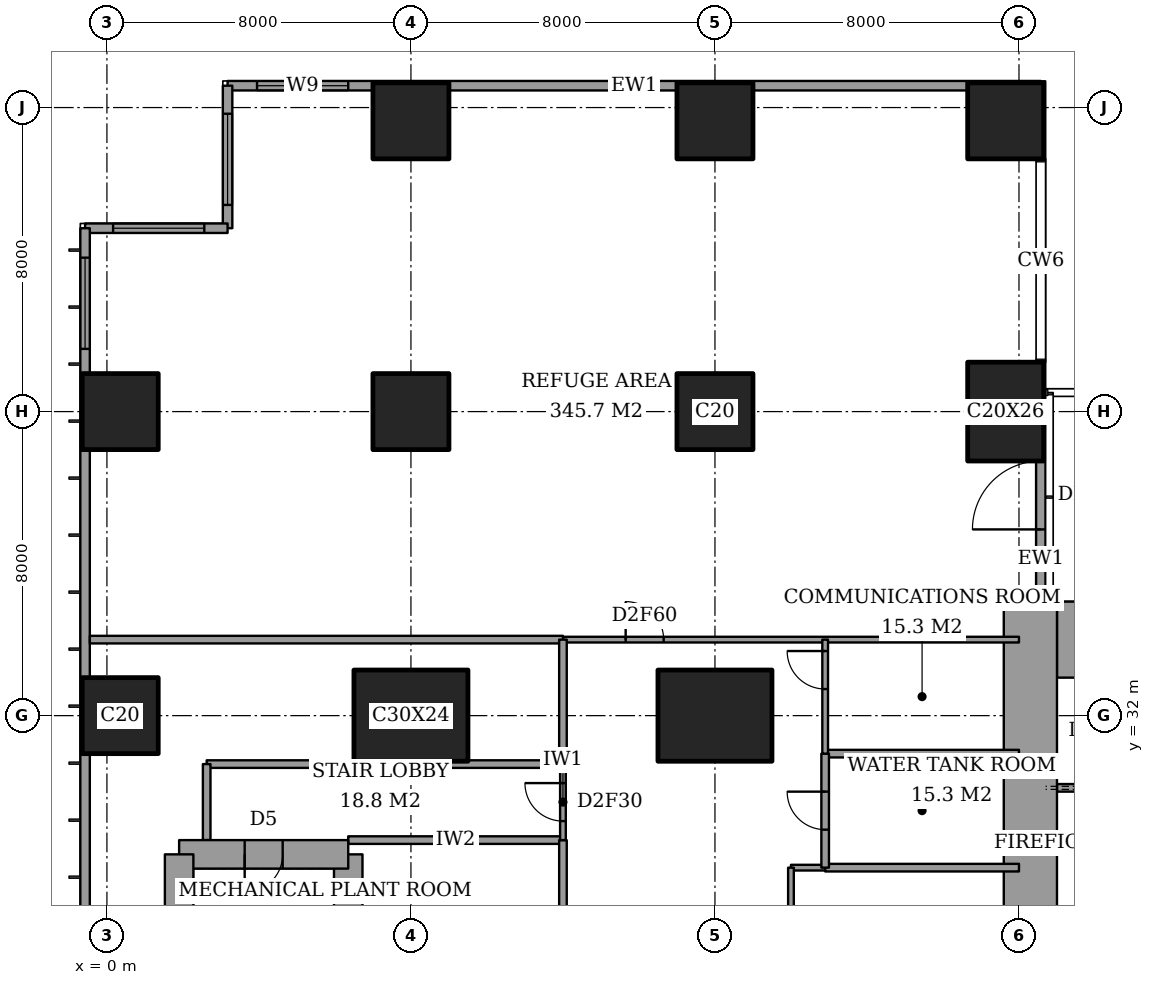
"""IFC4 building model, lengths in metres.
Left out: names, types, materials, properties, quantities, classifications, styles, units other than length and angle.
Written with IfcOpenShell. Run it as: python <this file> out.ifc"""

import sys

from ifc_helpers import new_model, si_unit, direction, frame, frame_2d, origin, origin_2d, place, context, subcontext, project, spatial, rectangle, extrude, element, fill, save


model = new_model("IFC4")
c1 = context("Model", 3, precision=1e-05, world=origin(), true_north=direction((0.0, 1.0)))
c2 = subcontext(c1, "Body", "Model", "MODEL_VIEW")
j1 = project(units=[si_unit("LENGTHUNIT", "METRE"), si_unit("PLANEANGLEUNIT", "RADIAN")], contexts=[c1])
p1 = place(None, origin())
s1 = spatial("IfcSite", under=j1, at=p1, CompositionType="ELEMENT")
p2 = place(p1, origin())
s2 = spatial("IfcBuilding", under=s1, at=p2, CompositionType="ELEMENT")
p3 = place(p2, frame((0.0, 0.0, 90.8)))
s3 = spatial("IfcBuildingStorey", under=s2, at=p3, CompositionType="ELEMENT", Elevation=90.8)
for number, where, z_axis, x_axis in (
    (1, (0.35, 32.0, 0.0), (0.0, 0.0, 1.0), (1.0, 0.0, 0.0)),
    (2, (0.35, 40.0, 0.0), (0.0, 0.0, 1.0), (1.0, 0.0, 0.0)),
):
    element("IfcColumn", number, at=place(p3, frame(where, z_axis=z_axis, x_axis=x_axis)), inside=s3, PredefinedType="COLUMN", context=c2, shape_type="SweptSolid", body=[
        extrude(rectangle(XDim=2.0, YDim=2.0, at=origin_2d()), origin(), (0.0, 0.0, 1.0), 5.4),
    ])
p4 = place(p3, frame((8.0, 32.0, 0.0), z_axis=(0.0, 0.0, 1.0), x_axis=(1.0, 0.0, 0.0)))
e3 = element("IfcColumn", 3, at=p4, inside=s3, PredefinedType="COLUMN", context=c2, shape_type="SweptSolid", body=[
    extrude(rectangle(XDim=3.0, YDim=2.4, at=origin_2d()), origin(), (0.0, 0.0, 1.0), 5.4),
])
for number, where, z_axis, x_axis in (
    (4, (8.0, 40.0, 0.0), (0.0, 0.0, 1.0), (1.0, 0.0, 0.0)),
    (5, (8.0, 47.65, 0.0), (0.0, 0.0, 1.0), (1.0, 0.0, 0.0)),
):
    element("IfcColumn", number, at=place(p3, frame(where, z_axis=z_axis, x_axis=x_axis)), inside=s3, PredefinedType="COLUMN", context=c2, shape_type="SweptSolid", body=[
        extrude(rectangle(XDim=2.0, YDim=2.0, at=origin_2d()), origin(), (0.0, 0.0, 1.0), 5.4),
    ])
p5 = place(p3, frame((16.0, 32.0, 0.0), z_axis=(0.0, 0.0, 1.0), x_axis=(1.0, 0.0, 0.0)))
e6 = element("IfcColumn", 6, at=p5, inside=s3, PredefinedType="COLUMN", context=c2, shape_type="SweptSolid", body=[
    extrude(rectangle(XDim=3.0, YDim=2.4, at=origin_2d()), origin(), (0.0, 0.0, 1.0), 5.4),
])
for number, where, z_axis, x_axis in (
    (7, (16.0, 40.0, 0.0), (0.0, 0.0, 1.0), (1.0, 0.0, 0.0)),
    (8, (16.0, 47.65, 0.0), (0.0, 0.0, 1.0), (1.0, 0.0, 0.0)),
):
    element("IfcColumn", number, at=place(p3, frame(where, z_axis=z_axis, x_axis=x_axis)), inside=s3, PredefinedType="COLUMN", context=c2, shape_type="SweptSolid", body=[
        extrude(rectangle(XDim=2.0, YDim=2.0, at=origin_2d()), origin(), (0.0, 0.0, 1.0), 5.4),
    ])
p6 = place(p3, frame((23.65, 40.0, 0.0), z_axis=(0.0, 0.0, 1.0), x_axis=(1.0, 0.0, 0.0)))
e9 = element("IfcColumn", 9, at=p6, inside=s3, PredefinedType="COLUMN", context=c2, shape_type="SweptSolid", body=[
    extrude(rectangle(XDim=2.0, YDim=2.6, at=origin_2d()), origin(), (0.0, 0.0, 1.0), 5.4),
])
p7 = place(p3, frame((23.65, 47.65, 0.0), z_axis=(0.0, 0.0, 1.0), x_axis=(1.0, 0.0, 0.0)))
e10 = element("IfcColumn", 10, at=p7, inside=s3, PredefinedType="COLUMN", context=c2, shape_type="SweptSolid", body=[
    extrude(rectangle(XDim=2.0, YDim=2.0, at=origin_2d()), origin(), (0.0, 0.0, 1.0), 5.4),
])
p8 = place(p3, frame((25.0, 34.0, 0.0), z_axis=(0.0, 0.0, 1.0), x_axis=(1.0, 0.0, 0.0)))
e11 = element("IfcWall", 11, at=p8, inside=s3, PredefinedType="SHEAR", context=c2, shape_type="SweptSolid", body=[
    extrude(rectangle(XDim=3.15, YDim=2.0, at=frame_2d((1.575, 0.0))), origin(), (0.0, 0.0, 1.0), 5.4),
])
p9 = place(p3, frame((24.3, 23.15, 0.0), z_axis=(0.0, 0.0, 1.0), x_axis=(0.0, 1.0, 0.0)))
e12 = element("IfcWall", 12, at=p9, inside=s3, PredefinedType="SHEAR", context=c2, shape_type="SweptSolid", body=[
    extrude(rectangle(XDim=11.85, YDim=1.4, at=frame_2d((5.925, 0.0))), origin(), (0.0, 0.0, 1.0), 5.4),
])
p10 = place(p9, frame((0.75, 0.0, 0.0)))
e13 = element("IfcOpeningElement", 13, at=p10, cuts=e12, PredefinedType="OPENING", context=c2, shape_type="SweptSolid", body=[
    extrude(rectangle(XDim=1.8, YDim=2.4, at=frame_2d((0.9, 1.2))), frame((0.0, 0.71, 0.0), z_axis=(0.0, -1.0, 0.0), x_axis=(1.0, 0.0, 0.0)), (0.0, 0.0, 1.0), 1.42),
])
p11 = place(p3, frame((6.35, 19.65, 0.0), z_axis=(0.0, 0.0, 1.0), x_axis=(0.0, 1.0, 0.0)))
e14 = element("IfcWall", 14, at=p11, inside=s3, PredefinedType="SHEAR", context=c2, shape_type="SweptSolid", body=[
    extrude(rectangle(XDim=8.7, YDim=0.75, at=frame_2d((4.35, 0.0))), origin(), (0.0, 0.0, 1.0), 5.4),
])
p12 = place(p3, frame((6.35, 28.35, 0.0), z_axis=(0.0, 0.0, 1.0), x_axis=(-1.0, 0.0, 0.0)))
e15 = element("IfcWall", 15, at=p12, inside=s3, PredefinedType="SHEAR", context=c2, shape_type="SweptSolid", body=[
    extrude(rectangle(XDim=4.45, YDim=0.75, at=frame_2d((2.225, 0.0))), origin(), (0.0, 0.0, 1.0), 5.4),
])
p13 = place(p12, frame((1.725, 0.0, 0.0)))
e16 = element("IfcOpeningElement", 16, at=p13, cuts=e15, PredefinedType="OPENING", context=c2, shape_type="SweptSolid", body=[
    extrude(rectangle(XDim=1.0, YDim=2.1, at=frame_2d((0.5, 1.05))), frame((0.0, 0.385, 0.0), z_axis=(0.0, -1.0, 0.0), x_axis=(1.0, 0.0, 0.0)), (0.0, 0.0, 1.0), 0.77),
])
p14 = place(p3, frame((1.9, 28.35, 0.0), z_axis=(0.0, 0.0, 1.0), x_axis=(0.0, -1.0, 0.0)))
e17 = element("IfcWall", 17, at=p14, inside=s3, PredefinedType="SHEAR", context=c2, shape_type="SweptSolid", body=[
    extrude(rectangle(XDim=8.7, YDim=0.75, at=frame_2d((4.35, 0.0))), origin(), (0.0, 0.0, 1.0), 5.4),
])
p15 = place(p3, frame((24.575, 35.0, 0.0), z_axis=(0.0, 0.0, 1.0), x_axis=(0.0, 1.0, 0.0)))
e18 = element("IfcWall", 18, at=p15, inside=s3, PredefinedType="SOLIDWALL", context=c2, shape_type="SweptSolid", body=[
    extrude(rectangle(XDim=5.6, YDim=0.25, at=frame_2d((2.8, 0.0))), origin(), (0.0, 0.0, 1.0), 5.4),
])
p16 = place(p15, frame((1.9, 0.0, 0.0)))
e19 = element("IfcOpeningElement", 19, at=p16, cuts=e18, PredefinedType="OPENING", context=c2, shape_type="SweptSolid", body=[
    extrude(rectangle(XDim=1.8, YDim=2.4, at=frame_2d((0.9, 1.2))), frame((0.0, 0.135, 0.0), z_axis=(0.0, -1.0, 0.0), x_axis=(1.0, 0.0, 0.0)), (0.0, 0.0, 1.0), 0.27),
])
p17 = place(p3, frame((24.575, 48.575, 0.0), z_axis=(0.0, 0.0, 1.0), x_axis=(-1.0, 0.0, 0.0)))
e20 = element("IfcWall", 20, at=p17, inside=s3, PredefinedType="SOLIDWALL", context=c2, shape_type="SweptSolid", body=[
    extrude(rectangle(XDim=21.4, YDim=0.25, at=frame_2d((10.7, 0.0))), origin(), (0.0, 0.0, 1.0), 5.4),
])
p18 = place(p17, frame((18.225, 0.0, 0.9)))
e21 = element("IfcOpeningElement", 21, at=p18, cuts=e20, PredefinedType="OPENING", context=c2, shape_type="SweptSolid", body=[
    extrude(rectangle(XDim=2.4, YDim=2.4, at=frame_2d((1.2, 1.2))), frame((0.0, 0.135, 0.0), z_axis=(0.0, -1.0, 0.0), x_axis=(1.0, 0.0, 0.0)), (0.0, 0.0, 1.0), 0.27),
])
p19 = place(p3, frame((3.175, 48.575, 0.0), z_axis=(0.0, 0.0, 1.0), x_axis=(0.0, -1.0, 0.0)))
e22 = element("IfcWall", 22, at=p19, inside=s3, PredefinedType="SOLIDWALL", context=c2, shape_type="SweptSolid", body=[
    extrude(rectangle(XDim=3.75, YDim=0.25, at=frame_2d((1.875, 0.0))), origin(), (0.0, 0.0, 1.0), 5.4),
])
p20 = place(p19, frame((0.738, 0.0, 0.9)))
e23 = element("IfcOpeningElement", 23, at=p20, cuts=e22, PredefinedType="OPENING", context=c2, shape_type="SweptSolid", body=[
    extrude(rectangle(XDim=2.4, YDim=2.4, at=frame_2d((1.2, 1.2))), frame((0.0, 0.135, 0.0), z_axis=(0.0, -1.0, 0.0), x_axis=(1.0, 0.0, 0.0)), (0.0, 0.0, 1.0), 0.27),
])
p21 = place(p3, frame((3.175, 44.825, 0.0), z_axis=(0.0, 0.0, 1.0), x_axis=(-1.0, 0.0, 0.0)))
e24 = element("IfcWall", 24, at=p21, inside=s3, PredefinedType="SOLIDWALL", context=c2, shape_type="SweptSolid", body=[
    extrude(rectangle(XDim=3.75, YDim=0.25, at=frame_2d((1.875, 0.0))), origin(), (0.0, 0.0, 1.0), 5.4),
])
p22 = place(p21, frame((0.613, 0.0, 0.9)))
e25 = element("IfcOpeningElement", 25, at=p22, cuts=e24, PredefinedType="OPENING", context=c2, shape_type="SweptSolid", body=[
    extrude(rectangle(XDim=2.4, YDim=2.4, at=frame_2d((1.2, 1.2))), frame((0.0, 0.135, 0.0), z_axis=(0.0, -1.0, 0.0), x_axis=(1.0, 0.0, 0.0)), (0.0, 0.0, 1.0), 0.27),
])
p23 = place(p3, frame((-0.575, 44.825, 0.0), z_axis=(0.0, 0.0, 1.0), x_axis=(0.0, -1.0, 0.0)))
e26 = element("IfcWall", 26, at=p23, inside=s3, PredefinedType="SOLIDWALL", context=c2, shape_type="SweptSolid", body=[
    extrude(rectangle(XDim=41.65, YDim=0.25, at=frame_2d((20.825, 0.0))), origin(), (0.0, 0.0, 1.0), 5.4),
])
p24 = place(p23, frame((0.775, 0.0, 0.9)))
e27 = element("IfcOpeningElement", 27, at=p24, cuts=e26, PredefinedType="OPENING", context=c2, shape_type="SweptSolid", body=[
    extrude(rectangle(XDim=2.4, YDim=2.4, at=frame_2d((1.2, 1.2))), frame((0.0, 0.135, 0.0), z_axis=(0.0, -1.0, 0.0), x_axis=(1.0, 0.0, 0.0)), (0.0, 0.0, 1.0), 0.27),
])
p25 = place(p23, frame((38.475, 0.0, 0.9)))
e28 = element("IfcOpeningElement", 28, at=p25, cuts=e26, PredefinedType="OPENING", context=c2, shape_type="SweptSolid", body=[
    extrude(rectangle(XDim=2.4, YDim=2.4, at=frame_2d((1.2, 1.2))), frame((0.0, 0.135, 0.0), z_axis=(0.0, -1.0, 0.0), x_axis=(1.0, 0.0, 0.0)), (0.0, 0.0, 1.0), 0.27),
])
p26 = place(p3, frame((18.9, 28.0, 0.0), z_axis=(0.0, 0.0, 1.0), x_axis=(1.0, 0.0, 0.0)))
e29 = element("IfcWall", 29, at=p26, inside=s3, PredefinedType="PARTITIONING", context=c2, shape_type="SweptSolid", body=[
    extrude(rectangle(XDim=5.1, YDim=0.2, at=frame_2d((2.55, 0.0))), origin(), (0.0, 0.0, 1.0), 5.15),
])
p27 = place(p3, frame((18.0, 28.0, 0.0), z_axis=(0.0, 0.0, 1.0), x_axis=(1.0, 0.0, 0.0)))
e30 = element("IfcWall", 30, at=p27, inside=s3, PredefinedType="PARTITIONING", context=c2, shape_type="SweptSolid", body=[
    extrude(rectangle(XDim=0.9, YDim=0.15, at=frame_2d((0.45, 0.0))), origin(), (0.0, 0.0, 1.0), 5.15),
])
p28 = place(p3, frame((6.35, 28.725, 0.0), z_axis=(0.0, 0.0, 1.0), x_axis=(1.0, 0.0, 0.0)))
e31 = element("IfcWall", 31, at=p28, inside=s3, PredefinedType="PARTITIONING", context=c2, shape_type="SweptSolid", body=[
    extrude(rectangle(XDim=5.65, YDim=0.2, at=frame_2d((2.825, 0.0))), origin(), (0.0, 0.0, 1.0), 5.15),
])
p29 = place(p3, frame((2.625, 30.725, 0.0), z_axis=(0.0, 0.0, 1.0), x_axis=(1.0, 0.0, 0.0)))
e32 = element("IfcWall", 32, at=p29, inside=s3, PredefinedType="PARTITIONING", context=c2, shape_type="SweptSolid", body=[
    extrude(rectangle(XDim=9.375, YDim=0.2, at=frame_2d((4.688, 0.0))), origin(), (0.0, 0.0, 1.0), 5.15),
])
p30 = place(p3, frame((18.9, 31.0, 0.0), z_axis=(0.0, 0.0, 1.0), x_axis=(1.0, 0.0, 0.0)))
e33 = element("IfcWall", 33, at=p30, inside=s3, PredefinedType="PARTITIONING", context=c2, shape_type="SweptSolid", body=[
    extrude(rectangle(XDim=5.1, YDim=0.2, at=frame_2d((2.55, 0.0))), origin(), (0.0, 0.0, 1.0), 5.15),
])
p31 = place(p3, frame((-0.45, 34.0, 0.0), z_axis=(0.0, 0.0, 1.0), x_axis=(1.0, 0.0, 0.0)))
e34 = element("IfcWall", 34, at=p31, inside=s3, PredefinedType="PARTITIONING", context=c2, shape_type="SweptSolid", body=[
    extrude(rectangle(XDim=12.45, YDim=0.2, at=frame_2d((6.225, 0.0))), origin(), (0.0, 0.0, 1.0), 5.15),
])
p32 = place(p3, frame((12.0, 34.0, 0.0), z_axis=(0.0, 0.0, 1.0), x_axis=(1.0, 0.0, 0.0)))
e35 = element("IfcWall", 35, at=p32, inside=s3, PredefinedType="PARTITIONING", context=c2, shape_type="SweptSolid", body=[
    extrude(rectangle(XDim=12.0, YDim=0.15, at=frame_2d((6.0, 0.0))), origin(), (0.0, 0.0, 1.0), 5.15),
])
p33 = place(p32, frame((1.65, 0.0, 0.0)))
e36 = element("IfcOpeningElement", 36, at=p33, cuts=e35, PredefinedType="OPENING", context=c2, shape_type="SweptSolid", body=[
    extrude(rectangle(XDim=1.0, YDim=2.1, at=frame_2d((0.5, 1.05))), frame((0.0, 0.085, 0.0), z_axis=(0.0, -1.0, 0.0), x_axis=(1.0, 0.0, 0.0)), (0.0, 0.0, 1.0), 0.17),
])
p34 = place(p3, frame((2.625, 28.725, 0.0), z_axis=(0.0, 0.0, 1.0), x_axis=(0.0, 1.0, 0.0)))
e37 = element("IfcWall", 37, at=p34, inside=s3, PredefinedType="PARTITIONING", context=c2, shape_type="SweptSolid", body=[
    extrude(rectangle(XDim=2.0, YDim=0.2, at=frame_2d((1.0, 0.0))), origin(), (0.0, 0.0, 1.0), 5.15),
])
p35 = place(p3, frame((12.0, 14.0, 0.0), z_axis=(0.0, 0.0, 1.0), x_axis=(0.0, 1.0, 0.0)))
e38 = element("IfcWall", 38, at=p35, inside=s3, PredefinedType="PARTITIONING", context=c2, shape_type="SweptSolid", body=[
    extrude(rectangle(XDim=14.725, YDim=0.2, at=frame_2d((7.363, 0.0))), origin(), (0.0, 0.0, 1.0), 5.15),
])
p36 = place(p35, frame((6.863, 0.0, 0.0)))
e39 = element("IfcOpeningElement", 39, at=p36, cuts=e38, PredefinedType="OPENING", context=c2, shape_type="SweptSolid", body=[
    extrude(rectangle(XDim=1.0, YDim=2.1, at=frame_2d((0.5, 1.05))), frame((0.0, 0.11, 0.0), z_axis=(0.0, -1.0, 0.0), x_axis=(1.0, 0.0, 0.0)), (0.0, 0.0, 1.0), 0.22),
])
p37 = place(p3, frame((12.0, 30.725, 0.0), z_axis=(0.0, 0.0, 1.0), x_axis=(0.0, 1.0, 0.0)))
e40 = element("IfcWall", 40, at=p37, inside=s3, PredefinedType="PARTITIONING", context=c2, shape_type="SweptSolid", body=[
    extrude(rectangle(XDim=3.275, YDim=0.2, at=frame_2d((1.637, 0.0))), origin(), (0.0, 0.0, 1.0), 5.15),
])
p38 = place(p3, frame((12.0, 28.725, 0.0), z_axis=(0.0, 0.0, 1.0), x_axis=(0.0, 1.0, 0.0)))
e41 = element("IfcWall", 41, at=p38, inside=s3, PredefinedType="PARTITIONING", context=c2, shape_type="SweptSolid", body=[
    extrude(rectangle(XDim=2.0, YDim=0.15, at=frame_2d((1.0, 0.0))), origin(), (0.0, 0.0, 1.0), 5.15),
])
p39 = place(p38, frame((0.5, 0.0, 0.0)))
e42 = element("IfcOpeningElement", 42, at=p39, cuts=e41, PredefinedType="OPENING", context=c2, shape_type="SweptSolid", body=[
    extrude(rectangle(XDim=1.0, YDim=2.1, at=frame_2d((0.5, 1.05))), frame((0.0, 0.085, 0.0), z_axis=(0.0, -1.0, 0.0), x_axis=(1.0, 0.0, 0.0)), (0.0, 0.0, 1.0), 0.17),
])
p40 = place(p3, frame((18.0, 20.0, 0.0), z_axis=(0.0, 0.0, 1.0), x_axis=(0.0, 1.0, 0.0)))
e43 = element("IfcWall", 43, at=p40, inside=s3, PredefinedType="PARTITIONING", context=c2, shape_type="SweptSolid", body=[
    extrude(rectangle(XDim=8.0, YDim=0.15, at=frame_2d((4.0, 0.0))), origin(), (0.0, 0.0, 1.0), 5.15),
])
p41 = place(p40, frame((4.8, 0.0, 0.0)))
e44 = element("IfcOpeningElement", 44, at=p41, cuts=e43, PredefinedType="OPENING", context=c2, shape_type="SweptSolid", body=[
    extrude(rectangle(XDim=1.0, YDim=2.1, at=frame_2d((0.5, 1.05))), frame((0.0, 0.085, 0.0), z_axis=(0.0, -1.0, 0.0), x_axis=(1.0, 0.0, 0.0)), (0.0, 0.0, 1.0), 0.17),
])
p42 = place(p3, frame((18.9, 28.0, 0.0), z_axis=(0.0, 0.0, 1.0), x_axis=(0.0, 1.0, 0.0)))
e45 = element("IfcWall", 45, at=p42, inside=s3, PredefinedType="PARTITIONING", context=c2, shape_type="SweptSolid", body=[
    extrude(rectangle(XDim=3.0, YDim=0.2, at=frame_2d((1.5, 0.0))), origin(), (0.0, 0.0, 1.0), 5.15),
])
p43 = place(p42, frame((1.0, 0.0, 0.0)))
e46 = element("IfcOpeningElement", 46, at=p43, cuts=e45, PredefinedType="OPENING", context=c2, shape_type="SweptSolid", body=[
    extrude(rectangle(XDim=1.0, YDim=2.1, at=frame_2d((0.5, 1.05))), frame((0.0, 0.11, 0.0), z_axis=(0.0, -1.0, 0.0), x_axis=(1.0, 0.0, 0.0)), (0.0, 0.0, 1.0), 0.22),
])
p44 = place(p3, frame((18.9, 31.0, 0.0), z_axis=(0.0, 0.0, 1.0), x_axis=(0.0, 1.0, 0.0)))
e47 = element("IfcWall", 47, at=p44, inside=s3, PredefinedType="PARTITIONING", context=c2, shape_type="SweptSolid", body=[
    extrude(rectangle(XDim=3.0, YDim=0.15, at=frame_2d((1.5, 0.0))), origin(), (0.0, 0.0, 1.0), 5.15),
])
p45 = place(p44, frame((1.7, 0.0, 0.0)))
e48 = element("IfcOpeningElement", 48, at=p45, cuts=e47, PredefinedType="OPENING", context=c2, shape_type="SweptSolid", body=[
    extrude(rectangle(XDim=1.0, YDim=2.1, at=frame_2d((0.5, 1.05))), frame((0.0, 0.085, 0.0), z_axis=(0.0, -1.0, 0.0), x_axis=(1.0, 0.0, 0.0)), (0.0, 0.0, 1.0), 0.17),
])
p46 = place(p3, frame((25.0, 30.1, 0.0), z_axis=(0.0, 0.0, 1.0), x_axis=(1.0, 0.0, 0.0)))
e49 = element("IfcWall", 49, at=p46, inside=s3, PredefinedType="PARTITIONING", context=c2, shape_type="SweptSolid", body=[
    extrude(rectangle(XDim=12.7, YDim=0.2, at=frame_2d((6.35, 0.0))), origin(), (0.0, 0.0, 1.0), 5.4),
])
p47 = place(p46, frame((0.9, 0.0, 0.0)))
e50 = element("IfcOpeningElement", 50, at=p47, cuts=e49, PredefinedType="OPENING", context=c2, shape_type="SweptSolid", body=[
    extrude(rectangle(XDim=1.2, YDim=2.1, at=frame_2d((0.6, 1.05))), frame((0.0, 0.11, 0.0), z_axis=(0.0, -1.0, 0.0), x_axis=(1.0, 0.0, 0.0)), (0.0, 0.0, 1.0), 0.22),
])
p48 = place(p16, origin())
e51 = element("IfcDoor", 51, at=p48, inside=s3, OperationType="DOUBLE_DOOR_DOUBLE_SWING", PredefinedType="DOOR", context=c2, shape_type="SweptSolid", body=[
    extrude(rectangle(XDim=1.8, YDim=2.4, at=frame_2d((0.9, 1.2))), frame((0.0, 0.025, 0.0), z_axis=(0.0, -1.0, 0.0), x_axis=(1.0, 0.0, 0.0)), (0.0, 0.0, 1.0), 0.05),
])
fill(e19, e51)
p49 = place(p18, origin())
e52 = element("IfcWindow", 52, at=p49, inside=s3, PartitioningType="SINGLE_PANEL", PredefinedType="WINDOW", context=c2, shape_type="SweptSolid", body=[
    extrude(rectangle(XDim=2.4, YDim=2.4, at=frame_2d((1.2, 1.2))), frame((0.0, 0.03, 0.0), z_axis=(0.0, -1.0, 0.0), x_axis=(1.0, 0.0, 0.0)), (0.0, 0.0, 1.0), 0.06),
])
fill(e21, e52)
p50 = place(p20, origin())
e53 = element("IfcWindow", 53, at=p50, inside=s3, PartitioningType="SINGLE_PANEL", PredefinedType="WINDOW", context=c2, shape_type="SweptSolid", body=[
    extrude(rectangle(XDim=2.4, YDim=2.4, at=frame_2d((1.2, 1.2))), frame((0.0, 0.03, 0.0), z_axis=(0.0, -1.0, 0.0), x_axis=(1.0, 0.0, 0.0)), (0.0, 0.0, 1.0), 0.06),
])
fill(e23, e53)
p51 = place(p22, origin())
e54 = element("IfcWindow", 54, at=p51, inside=s3, PartitioningType="SINGLE_PANEL", PredefinedType="WINDOW", context=c2, shape_type="SweptSolid", body=[
    extrude(rectangle(XDim=2.4, YDim=2.4, at=frame_2d((1.2, 1.2))), frame((0.0, 0.03, 0.0), z_axis=(0.0, -1.0, 0.0), x_axis=(1.0, 0.0, 0.0)), (0.0, 0.0, 1.0), 0.06),
])
fill(e25, e54)
p52 = place(p24, origin())
e55 = element("IfcWindow", 55, at=p52, inside=s3, PartitioningType="SINGLE_PANEL", PredefinedType="WINDOW", context=c2, shape_type="SweptSolid", body=[
    extrude(rectangle(XDim=2.4, YDim=2.4, at=frame_2d((1.2, 1.2))), frame((0.0, 0.03, 0.0), z_axis=(0.0, -1.0, 0.0), x_axis=(1.0, 0.0, 0.0)), (0.0, 0.0, 1.0), 0.06),
])
fill(e27, e55)
p53 = place(p33, origin())
e56 = element("IfcDoor", 56, at=p53, inside=s3, OperationType="SINGLE_SWING_RIGHT", PredefinedType="DOOR", context=c2, shape_type="SweptSolid", body=[
    extrude(rectangle(XDim=1.0, YDim=2.1, at=frame_2d((0.5, 1.05))), frame((0.0, 0.025, 0.0), z_axis=(0.0, -1.0, 0.0), x_axis=(1.0, 0.0, 0.0)), (0.0, 0.0, 1.0), 0.05),
])
fill(e36, e56)
p54 = place(p43, origin())
e57 = element("IfcDoor", 57, at=p54, inside=s3, OperationType="SINGLE_SWING_LEFT", PredefinedType="DOOR", context=c2, shape_type="SweptSolid", body=[
    extrude(rectangle(XDim=1.0, YDim=2.1, at=frame_2d((0.5, 1.05))), frame((0.0, 0.025, 0.0), z_axis=(0.0, -1.0, 0.0), x_axis=(1.0, 0.0, 0.0)), (0.0, 0.0, 1.0), 0.05),
])
fill(e46, e57)
p55 = place(p45, origin())
e58 = element("IfcDoor", 58, at=p55, inside=s3, OperationType="SINGLE_SWING_LEFT", PredefinedType="DOOR", context=c2, shape_type="SweptSolid", body=[
    extrude(rectangle(XDim=1.0, YDim=2.1, at=frame_2d((0.5, 1.05))), frame((0.0, 0.025, 0.0), z_axis=(0.0, -1.0, 0.0), x_axis=(1.0, 0.0, 0.0)), (0.0, 0.0, 1.0), 0.05),
])
fill(e48, e58)
p56 = place(p39, origin())
e59 = element("IfcDoor", 59, at=p56, inside=s3, OperationType="SINGLE_SWING_LEFT", PredefinedType="DOOR", context=c2, shape_type="SweptSolid", body=[
    extrude(rectangle(XDim=1.0, YDim=2.1, at=frame_2d((0.5, 1.05))), frame((0.0, 0.025, 0.0), z_axis=(0.0, -1.0, 0.0), x_axis=(1.0, 0.0, 0.0)), (0.0, 0.0, 1.0), 0.05),
])
fill(e42, e59)
p57 = place(p13, origin())
e60 = element("IfcDoor", 60, at=p57, inside=s3, OperationType="SINGLE_SWING_LEFT", PredefinedType="DOOR", context=c2, shape_type="SweptSolid", body=[
    extrude(rectangle(XDim=1.0, YDim=2.1, at=frame_2d((0.5, 1.05))), frame((0.0, 0.025, 0.0), z_axis=(0.0, -1.0, 0.0), x_axis=(1.0, 0.0, 0.0)), (0.0, 0.0, 1.0), 0.05),
])
fill(e16, e60)
save(model, sys.argv[1])
